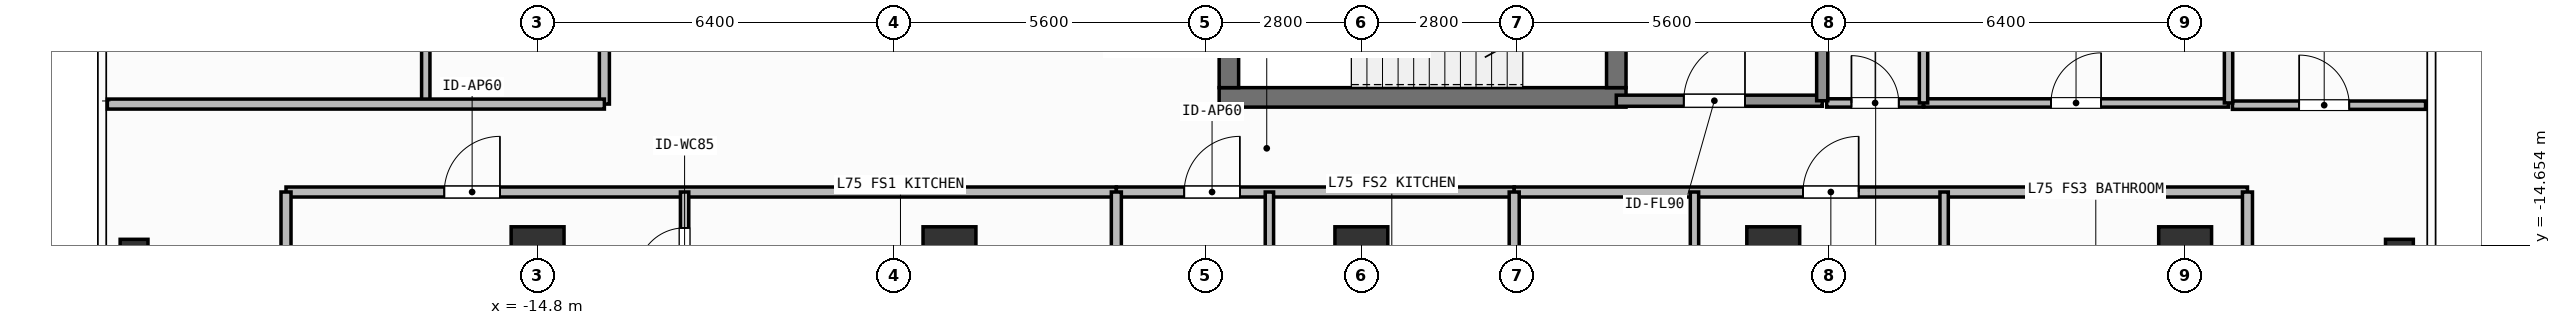
"""IFC4 building model, lengths in metres.
Left out: names, types, materials, properties, quantities, classifications, styles, units other than length and angle.
Written with IfcOpenShell. Run it as: python <this file> out.ifc"""

import sys

from ifc_helpers import new_model, si_unit, direction, frame, frame_2d, origin, origin_2d, place, context, subcontext, project, spatial, rectangle, hollow_rectangle, extrude, element, fill, save


model = new_model("IFC4")
c1 = context("Model", 3, precision=1e-05, world=origin(), true_north=direction((0.0, 1.0)))
c2 = subcontext(c1, "Body", "Model", "MODEL_VIEW")
j1 = project(units=[si_unit("LENGTHUNIT", "METRE"), si_unit("PLANEANGLEUNIT", "RADIAN")], contexts=[c1])
p1 = place(None, origin())
s1 = spatial("IfcSite", under=j1, at=p1, CompositionType="ELEMENT")
p2 = place(p1, origin())
s2 = spatial("IfcBuilding", under=s1, at=p2, CompositionType="ELEMENT")
p3 = place(p2, frame((0.0, 0.0, 305.4)))
s3 = spatial("IfcBuildingStorey", under=s2, at=p3, CompositionType="ELEMENT", Elevation=305.4)
p4 = place(p3, frame((-2.555, -12.0, 0.0), z_axis=(0.0, 0.0, 1.0), x_axis=(1.0, 0.0, 0.0)))
e1 = element("IfcWall", 1, at=p4, inside=s3, PredefinedType="SHEAR", context=c2, shape_type="SweptSolid", body=[
    extrude(rectangle(XDim=7.31, YDim=0.35, at=frame_2d((3.655, 0.0))), origin(), (0.0, 0.0, 1.0), 3.9),
])
p5 = place(p3, frame((-2.38, -11.825, 0.0), z_axis=(0.0, 0.0, 1.0), x_axis=(0.0, 1.0, 0.0)))
e2 = element("IfcWall", 2, at=p5, inside=s3, PredefinedType="SHEAR", context=c2, shape_type="SweptSolid", body=[
    extrude(rectangle(XDim=2.925, YDim=0.35, at=frame_2d((1.462, 0.0))), origin(), (0.0, 0.0, 1.0), 3.9),
])
p6 = place(p3, frame((4.58, -8.9, 0.0), z_axis=(0.0, 0.0, 1.0), x_axis=(0.0, -1.0, 0.0)))
e3 = element("IfcWall", 3, at=p6, inside=s3, PredefinedType="SHEAR", context=c2, shape_type="SweptSolid", body=[
    extrude(rectangle(XDim=2.925, YDim=0.35, at=frame_2d((1.462, 0.0))), origin(), (0.0, 0.0, 1.0), 3.9),
])
p7 = place(p6, frame((0.913, 0.0, 0.0)))
e4 = element("IfcOpeningElement", 4, at=p7, cuts=e3, PredefinedType="OPENING", context=c2, shape_type="SweptSolid", body=[
    extrude(rectangle(XDim=1.1, YDim=2.15, at=frame_2d((0.55, 1.075))), frame((0.0, 0.185, 0.0), z_axis=(0.0, -1.0, 0.0), x_axis=(1.0, 0.0, 0.0)), (0.0, 0.0, 1.0), 0.37),
])
for number, where, z_axis, x_axis in (
    (5, (-14.8, -14.8, 0.0), (0.0, 0.0, 1.0), (1.0, 0.0, 0.0)),
    (6, (-7.4, -14.8, 0.0), (0.0, 0.0, 1.0), (1.0, 0.0, 0.0)),
    (7, (0.0, -14.8, 0.0), (0.0, 0.0, 1.0), (1.0, 0.0, 0.0)),
    (8, (7.4, -14.8, 0.0), (0.0, 0.0, 1.0), (1.0, 0.0, 0.0)),
    (9, (14.8, -14.8, 0.0), (0.0, 0.0, 1.0), (1.0, 0.0, 0.0)),
):
    element("IfcColumn", number, at=place(p3, frame(where, z_axis=z_axis, x_axis=x_axis)), inside=s3, PredefinedType="COLUMN", context=c2, shape_type="SweptSolid", body=[
        extrude(rectangle(XDim=0.95, YDim=0.95, at=origin_2d()), origin(), (0.0, 0.0, 1.0), 3.9),
    ])
for number, where, z_axis, x_axis in (
    (10, (-22.05, -14.8, 0.0), (0.0, 0.0, 1.0), (1.0, 0.0, 0.0)),
    (11, (18.65, -14.8, 0.0), (0.0, 0.0, 1.0), (1.0, 0.0, 0.0)),
):
    element("IfcColumn", number, at=place(p3, frame(where, z_axis=z_axis, x_axis=x_axis)), inside=s3, PredefinedType="COLUMN", context=c2, shape_type="SweptSolid", body=[
        extrude(hollow_rectangle(XDim=0.5, YDim=0.5, WallThickness=0.025, at=origin_2d()), origin(), (0.0, 0.0, 1.0), 3.9),
    ])
p8 = place(p3, frame((4.58, -12.06, 0.0), z_axis=(0.0, 0.0, 1.0), x_axis=(1.0, 0.0, 0.0)))
e12 = element("IfcWall", 12, at=p8, inside=s3, PredefinedType="SOLIDWALL", context=c2, shape_type="SweptSolid", body=[
    extrude(rectangle(XDim=3.7, YDim=0.2, at=frame_2d((1.85, 0.0))), origin(), (0.0, 0.0, 1.0), 3.68),
])
p9 = place(p8, frame((1.212, 0.0, 0.0)))
e13 = element("IfcOpeningElement", 13, at=p9, cuts=e12, PredefinedType="OPENING", context=c2, shape_type="SweptSolid", body=[
    extrude(rectangle(XDim=1.1, YDim=2.15, at=frame_2d((0.55, 1.075))), frame((0.0, 0.11, 0.0), z_axis=(0.0, -1.0, 0.0), x_axis=(1.0, 0.0, 0.0)), (0.0, 0.0, 1.0), 0.22),
])
p10 = place(p3, frame((8.36, -12.1, 0.0), z_axis=(0.0, 0.0, 1.0), x_axis=(1.0, 0.0, 0.0)))
e14 = element("IfcWall", 14, at=p10, inside=s3, PredefinedType="PARTITIONING", context=c2, shape_type="SweptSolid", body=[
    extrude(rectangle(XDim=1.74, YDim=0.15, at=frame_2d((0.87, 0.0))), origin(), (0.0, 0.0, 1.0), 3.68),
])
p11 = place(p10, frame((0.445, 0.0, 0.0)))
e15 = element("IfcOpeningElement", 15, at=p11, cuts=e14, PredefinedType="OPENING", context=c2, shape_type="SweptSolid", body=[
    extrude(rectangle(XDim=0.85, YDim=2.1, at=frame_2d((0.425, 1.05))), frame((0.0, 0.085, 0.0), z_axis=(0.0, -1.0, 0.0), x_axis=(1.0, 0.0, 0.0)), (0.0, 0.0, 1.0), 0.17),
])
p12 = place(p3, frame((10.1, -12.1, 0.0), z_axis=(0.0, 0.0, 1.0), x_axis=(1.0, 0.0, 0.0)))
e16 = element("IfcWall", 16, at=p12, inside=s3, PredefinedType="PARTITIONING", context=c2, shape_type="SweptSolid", body=[
    extrude(rectangle(XDim=5.48, YDim=0.15, at=frame_2d((2.74, 0.0))), origin(), (0.0, 0.0, 1.0), 3.68),
])
p13 = place(p12, frame((2.29, 0.0, 0.0)))
e17 = element("IfcOpeningElement", 17, at=p13, cuts=e16, PredefinedType="OPENING", context=c2, shape_type="SweptSolid", body=[
    extrude(rectangle(XDim=0.9, YDim=2.1, at=frame_2d((0.45, 1.05))), frame((0.0, 0.085, 0.0), z_axis=(0.0, -1.0, 0.0), x_axis=(1.0, 0.0, 0.0)), (0.0, 0.0, 1.0), 0.17),
])
p14 = place(p3, frame((-19.32, -13.7, 0.0), z_axis=(0.0, 0.0, 1.0), x_axis=(1.0, 0.0, 0.0)))
e18 = element("IfcWall", 18, at=p14, inside=s3, PredefinedType="PARTITIONING", context=c2, shape_type="SweptSolid", body=[
    extrude(rectangle(XDim=14.918, YDim=0.18, at=frame_2d((7.459, 0.0))), origin(), (0.0, 0.0, 1.0), 3.68),
])
p15 = place(p14, frame((2.844, 0.0, 0.0)))
e19 = element("IfcOpeningElement", 19, at=p15, cuts=e18, PredefinedType="OPENING", context=c2, shape_type="SweptSolid", body=[
    extrude(rectangle(XDim=1.0, YDim=2.2, at=frame_2d((0.5, 1.1))), frame((0.0, 0.1, 0.0), z_axis=(0.0, -1.0, 0.0), x_axis=(1.0, 0.0, 0.0)), (0.0, 0.0, 1.0), 0.2),
])
p16 = place(p3, frame((-12.159, -15.839, 0.0), z_axis=(0.0, 0.0, 1.0), x_axis=(0.0, 1.0, 0.0)))
e20 = element("IfcWall", 20, at=p16, inside=s3, PredefinedType="PARTITIONING", context=c2, shape_type="SweptSolid", body=[
    extrude(rectangle(XDim=2.139, YDim=0.15, at=frame_2d((1.07, 0.0))), origin(), (0.0, 0.0, 1.0), 3.68),
])
p17 = place(p16, frame((0.645, 0.0, 0.0)))
e21 = element("IfcOpeningElement", 21, at=p17, cuts=e20, PredefinedType="OPENING", context=c2, shape_type="SweptSolid", body=[
    extrude(rectangle(XDim=0.85, YDim=2.1, at=frame_2d((0.425, 1.05))), frame((0.0, 0.085, 0.0), z_axis=(0.0, -1.0, 0.0), x_axis=(1.0, 0.0, 0.0)), (0.0, 0.0, 1.0), 0.17),
])
p18 = place(p3, frame((-4.402, -13.7, 0.0), z_axis=(0.0, 0.0, 1.0), x_axis=(1.0, 0.0, 0.0)))
e22 = element("IfcWall", 22, at=p18, inside=s3, PredefinedType="PARTITIONING", context=c2, shape_type="SweptSolid", body=[
    extrude(rectangle(XDim=7.148, YDim=0.18, at=frame_2d((3.574, 0.0))), origin(), (0.0, 0.0, 1.0), 3.68),
])
p19 = place(p18, frame((1.219, 0.0, 0.0)))
e23 = element("IfcOpeningElement", 23, at=p19, cuts=e22, PredefinedType="OPENING", context=c2, shape_type="SweptSolid", body=[
    extrude(rectangle(XDim=1.0, YDim=2.2, at=frame_2d((0.5, 1.1))), frame((0.0, 0.1, 0.0), z_axis=(0.0, -1.0, 0.0), x_axis=(1.0, 0.0, 0.0)), (0.0, 0.0, 1.0), 0.2),
])
p20 = place(p3, frame((-1.652, -15.803, 0.0), z_axis=(0.0, 0.0, 1.0), x_axis=(0.0, 1.0, 0.0)))
e24 = element("IfcWall", 24, at=p20, inside=s3, PredefinedType="PARTITIONING", context=c2, shape_type="SweptSolid", body=[
    extrude(rectangle(XDim=2.103, YDim=0.15, at=frame_2d((1.052, 0.0))), origin(), (0.0, 0.0, 1.0), 3.68),
])
p21 = place(p3, frame((2.746, -13.7, 0.0), z_axis=(0.0, 0.0, 1.0), x_axis=(1.0, 0.0, 0.0)))
e25 = element("IfcWall", 25, at=p21, inside=s3, PredefinedType="PARTITIONING", context=c2, shape_type="SweptSolid", body=[
    extrude(rectangle(XDim=13.174, YDim=0.18, at=frame_2d((6.587, 0.0))), origin(), (0.0, 0.0, 1.0), 3.68),
])
p22 = place(p21, frame((5.189, 0.0, 0.0)))
e26 = element("IfcOpeningElement", 26, at=p22, cuts=e25, PredefinedType="OPENING", context=c2, shape_type="SweptSolid", body=[
    extrude(rectangle(XDim=1.0, YDim=2.2, at=frame_2d((0.5, 1.1))), frame((0.0, 0.1, 0.0), z_axis=(0.0, -1.0, 0.0), x_axis=(1.0, 0.0, 0.0)), (0.0, 0.0, 1.0), 0.2),
])
p23 = place(p3, frame((5.985, -17.219, 0.0), z_axis=(0.0, 0.0, 1.0), x_axis=(0.0, 1.0, 0.0)))
e27 = element("IfcWall", 27, at=p23, inside=s3, PredefinedType="PARTITIONING", context=c2, shape_type="SweptSolid", body=[
    extrude(rectangle(XDim=3.519, YDim=0.15, at=frame_2d((1.76, 0.0))), origin(), (0.0, 0.0, 1.0), 3.68),
])
p24 = place(p23, frame((0.999, 0.0, 0.0)))
e28 = element("IfcOpeningElement", 28, at=p24, cuts=e27, PredefinedType="OPENING", context=c2, shape_type="SweptSolid", body=[
    extrude(rectangle(XDim=0.85, YDim=2.1, at=frame_2d((0.425, 1.05))), frame((0.0, 0.085, 0.0), z_axis=(0.0, -1.0, 0.0), x_axis=(1.0, 0.0, 0.0)), (0.0, 0.0, 1.0), 0.17),
])
p25 = place(p3, frame((10.47, -17.219, 0.0), z_axis=(0.0, 0.0, 1.0), x_axis=(0.0, 1.0, 0.0)))
e29 = element("IfcWall", 29, at=p25, inside=s3, PredefinedType="PARTITIONING", context=c2, shape_type="SweptSolid", body=[
    extrude(rectangle(XDim=3.519, YDim=0.15, at=frame_2d((1.76, 0.0))), origin(), (0.0, 0.0, 1.0), 3.68),
])
p26 = place(p25, frame((1.334, 0.0, 0.0)))
e30 = element("IfcOpeningElement", 30, at=p26, cuts=e29, PredefinedType="OPENING", context=c2, shape_type="SweptSolid", body=[
    extrude(rectangle(XDim=0.85, YDim=2.1, at=frame_2d((0.425, 1.05))), frame((0.0, 0.085, 0.0), z_axis=(0.0, -1.0, 0.0), x_axis=(1.0, 0.0, 0.0)), (0.0, 0.0, 1.0), 0.17),
])
p27 = place(p3, frame((-13.6, -12.12, 0.0), z_axis=(0.0, 0.0, 1.0), x_axis=(0.0, 1.0, 0.0)))
e31 = element("IfcWall", 31, at=p27, inside=s3, PredefinedType="PARTITIONING", context=c2, shape_type="SweptSolid", body=[
    extrude(rectangle(XDim=24.24, YDim=0.18, at=frame_2d((12.12, 0.0))), origin(), (0.0, 0.0, 1.0), 3.68),
])
p28 = place(p27, frame((9.829, 0.0, 0.0)))
e32 = element("IfcOpeningElement", 32, at=p28, cuts=e31, PredefinedType="OPENING", context=c2, shape_type="SweptSolid", body=[
    extrude(rectangle(XDim=1.0, YDim=2.2, at=frame_2d((0.5, 1.1))), frame((0.0, 0.1, 0.0), z_axis=(0.0, -1.0, 0.0), x_axis=(1.0, 0.0, 0.0)), (0.0, 0.0, 1.0), 0.2),
])
p29 = place(p3, frame((15.65, -12.14, 0.0), z_axis=(0.0, 0.0, 1.0), x_axis=(1.0, 0.0, 0.0)))
e33 = element("IfcWall", 33, at=p29, inside=s3, PredefinedType="PARTITIONING", context=c2, shape_type="SweptSolid", body=[
    extrude(rectangle(XDim=3.47, YDim=0.15, at=frame_2d((1.735, 0.0))), origin(), (0.0, 0.0, 1.0), 3.68),
])
p30 = place(p29, frame((1.198, 0.0, 0.0)))
e34 = element("IfcOpeningElement", 34, at=p30, cuts=e33, PredefinedType="OPENING", context=c2, shape_type="SweptSolid", body=[
    extrude(rectangle(XDim=0.9, YDim=2.1, at=frame_2d((0.45, 1.05))), frame((0.0, 0.085, 0.0), z_axis=(0.0, -1.0, 0.0), x_axis=(1.0, 0.0, 0.0)), (0.0, 0.0, 1.0), 0.17),
])
p31 = place(p3, frame((8.28, -12.06, 0.0), z_axis=(0.0, 0.0, 1.0), x_axis=(0.0, 1.0, 0.0)))
e35 = element("IfcWall", 35, at=p31, inside=s3, PredefinedType="SOLIDWALL", context=c2, shape_type="SweptSolid", body=[
    extrude(rectangle(XDim=3.335, YDim=0.2, at=frame_2d((1.667, 0.0))), origin(), (0.0, 0.0, 1.0), 3.68),
])
p32 = place(p3, frame((10.1, -12.1, 0.0), z_axis=(0.0, 0.0, 1.0), x_axis=(0.0, 1.0, 0.0)))
e36 = element("IfcWall", 36, at=p32, inside=s3, PredefinedType="PARTITIONING", context=c2, shape_type="SweptSolid", body=[
    extrude(rectangle(XDim=2.35, YDim=0.15, at=frame_2d((1.175, 0.0))), origin(), (0.0, 0.0, 1.0), 3.68),
])
p33 = place(p3, frame((15.58, -12.1, 0.0), z_axis=(0.0, 0.0, 1.0), x_axis=(0.0, 1.0, 0.0)))
e37 = element("IfcWall", 37, at=p33, inside=s3, PredefinedType="PARTITIONING", context=c2, shape_type="SweptSolid", body=[
    extrude(rectangle(XDim=6.25, YDim=0.15, at=frame_2d((3.125, 0.0))), origin(), (0.0, 0.0, 1.0), 3.68),
])
for number, where, z_axis, x_axis in (
    (38, (-19.32, -19.51, 0.0), (0.0, 0.0, 1.0), (0.0, 1.0, 0.0)),
    (39, (15.92, -19.51, 0.0), (0.0, 0.0, 1.0), (0.0, 1.0, 0.0)),
):
    element("IfcWall", number, at=place(p3, frame(where, z_axis=z_axis, x_axis=x_axis)), inside=s3, PredefinedType="PARTITIONING", context=c2, shape_type="SweptSolid", body=[
        extrude(rectangle(XDim=5.81, YDim=0.18, at=frame_2d((2.905, 0.0))), origin(), (0.0, 0.0, 1.0), 3.68),
    ])
for number, where, z_axis, x_axis in (
    (40, (-4.402, -20.63, 0.0), (0.0, 0.0, 1.0), (0.0, 1.0, 0.0)),
    (41, (2.746, -20.63, 0.0), (0.0, 0.0, 1.0), (0.0, 1.0, 0.0)),
):
    element("IfcWall", number, at=place(p3, frame(where, z_axis=z_axis, x_axis=x_axis)), inside=s3, PredefinedType="PARTITIONING", context=c2, shape_type="SweptSolid", body=[
        extrude(rectangle(XDim=6.93, YDim=0.18, at=frame_2d((3.465, 0.0))), origin(), (0.0, 0.0, 1.0), 3.68),
    ])
p34 = place(p3, frame((-16.809, -12.12, 0.0), z_axis=(0.0, 0.0, 1.0), x_axis=(0.0, 1.0, 0.0)))
e42 = element("IfcWall", 42, at=p34, inside=s3, PredefinedType="PARTITIONING", context=c2, shape_type="SweptSolid", body=[
    extrude(rectangle(XDim=2.8, YDim=0.15, at=frame_2d((1.4, 0.0))), origin(), (0.0, 0.0, 1.0), 3.68),
])
p35 = place(p3, frame((-22.53, -12.12, 0.0), z_axis=(0.0, 0.0, 1.0), x_axis=(1.0, 0.0, 0.0)))
e43 = element("IfcWall", 43, at=p35, inside=s3, PredefinedType="PARTITIONING", context=c2, shape_type="SweptSolid", body=[
    extrude(rectangle(XDim=8.93, YDim=0.18, at=frame_2d((4.465, 0.0))), origin(), (0.0, 0.0, 1.0), 3.68),
])
p36 = place(p9, origin())
e44 = element("IfcDoor", 44, at=p36, inside=s3, OperationType="SINGLE_SWING_RIGHT", PredefinedType="DOOR", context=c2, shape_type="SweptSolid", body=[
    extrude(rectangle(XDim=1.1, YDim=2.15, at=frame_2d((0.55, 1.075))), frame((0.0, 0.025, 0.0), z_axis=(0.0, -1.0, 0.0), x_axis=(1.0, 0.0, 0.0)), (0.0, 0.0, 1.0), 0.05),
])
fill(e13, e44)
p37 = place(p11, origin())
e45 = element("IfcDoor", 45, at=p37, inside=s3, OperationType="SINGLE_SWING_LEFT", PredefinedType="DOOR", context=c2, shape_type="SweptSolid", body=[
    extrude(rectangle(XDim=0.85, YDim=2.1, at=frame_2d((0.425, 1.05))), frame((0.0, 0.025, 0.0), z_axis=(0.0, -1.0, 0.0), x_axis=(1.0, 0.0, 0.0)), (0.0, 0.0, 1.0), 0.05),
])
fill(e15, e45)
p38 = place(p13, origin())
e46 = element("IfcDoor", 46, at=p38, inside=s3, OperationType="SINGLE_SWING_RIGHT", PredefinedType="DOOR", context=c2, shape_type="SweptSolid", body=[
    extrude(rectangle(XDim=0.9, YDim=2.1, at=frame_2d((0.45, 1.05))), frame((0.0, 0.025, 0.0), z_axis=(0.0, -1.0, 0.0), x_axis=(1.0, 0.0, 0.0)), (0.0, 0.0, 1.0), 0.05),
])
fill(e17, e46)
p39 = place(p15, origin())
e47 = element("IfcDoor", 47, at=p39, inside=s3, OperationType="SINGLE_SWING_RIGHT", PredefinedType="DOOR", context=c2, shape_type="SweptSolid", body=[
    extrude(rectangle(XDim=1.0, YDim=2.2, at=frame_2d((0.5, 1.1))), frame((0.0, 0.025, 0.0), z_axis=(0.0, -1.0, 0.0), x_axis=(1.0, 0.0, 0.0)), (0.0, 0.0, 1.0), 0.05),
])
fill(e19, e47)
p40 = place(p17, origin())
e48 = element("IfcDoor", 48, at=p40, inside=s3, OperationType="SINGLE_SWING_LEFT", PredefinedType="DOOR", context=c2, shape_type="SweptSolid", body=[
    extrude(rectangle(XDim=0.85, YDim=2.1, at=frame_2d((0.425, 1.05))), frame((0.0, 0.025, 0.0), z_axis=(0.0, -1.0, 0.0), x_axis=(1.0, 0.0, 0.0)), (0.0, 0.0, 1.0), 0.05),
])
fill(e21, e48)
p41 = place(p19, origin())
e49 = element("IfcDoor", 49, at=p41, inside=s3, OperationType="SINGLE_SWING_RIGHT", PredefinedType="DOOR", context=c2, shape_type="SweptSolid", body=[
    extrude(rectangle(XDim=1.0, YDim=2.2, at=frame_2d((0.5, 1.1))), frame((0.0, 0.025, 0.0), z_axis=(0.0, -1.0, 0.0), x_axis=(1.0, 0.0, 0.0)), (0.0, 0.0, 1.0), 0.05),
])
fill(e23, e49)
p42 = place(p22, origin())
e50 = element("IfcDoor", 50, at=p42, inside=s3, OperationType="SINGLE_SWING_RIGHT", PredefinedType="DOOR", context=c2, shape_type="SweptSolid", body=[
    extrude(rectangle(XDim=1.0, YDim=2.2, at=frame_2d((0.5, 1.1))), frame((0.0, 0.025, 0.0), z_axis=(0.0, -1.0, 0.0), x_axis=(1.0, 0.0, 0.0)), (0.0, 0.0, 1.0), 0.05),
])
fill(e26, e50)
p43 = place(p30, origin())
e51 = element("IfcDoor", 51, at=p43, inside=s3, OperationType="SINGLE_SWING_LEFT", PredefinedType="DOOR", context=c2, shape_type="SweptSolid", body=[
    extrude(rectangle(XDim=0.9, YDim=2.1, at=frame_2d((0.45, 1.05))), frame((0.0, 0.025, 0.0), z_axis=(0.0, -1.0, 0.0), x_axis=(1.0, 0.0, 0.0)), (0.0, 0.0, 1.0), 0.05),
])
fill(e34, e51)
save(model, sys.argv[1])
